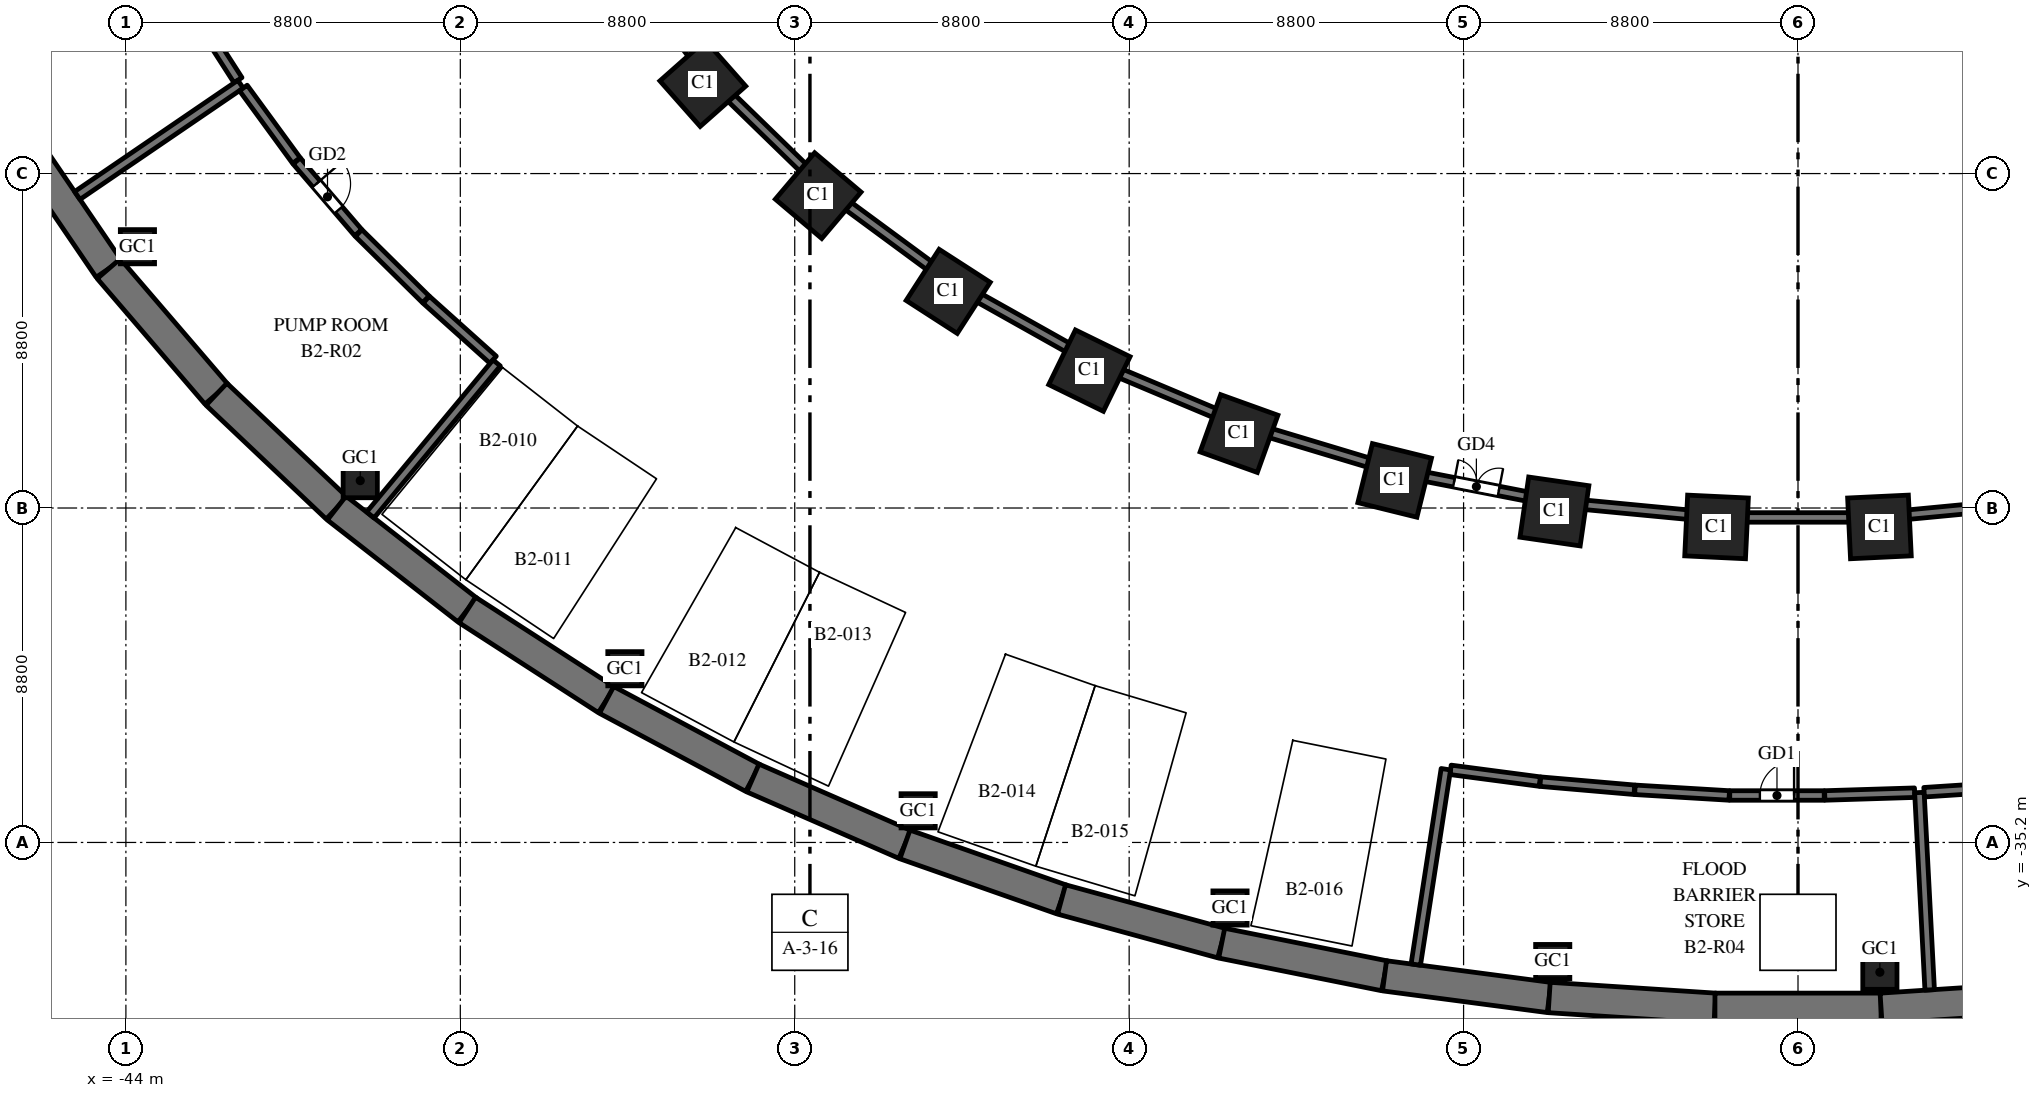
"""IFC4 building model, lengths in metres.
Left out: names, types, materials, properties, quantities, classifications, styles, units other than length and angle.
Written with IfcOpenShell. Run it as: python <this file> out.ifc"""

import sys

from ifc_helpers import new_model, si_unit, direction, frame, frame_2d, origin, origin_2d, place, context, subcontext, project, spatial, rectangle, hollow_rectangle, extrude, element, fill, save


model = new_model("IFC4")
c1 = context("Model", 3, precision=1e-05, world=origin(), true_north=direction((0.0, 1.0)))
c2 = subcontext(c1, "Body", "Model", "MODEL_VIEW")
j1 = project(units=[si_unit("LENGTHUNIT", "METRE"), si_unit("PLANEANGLEUNIT", "RADIAN")], contexts=[c1])
p1 = place(None, origin())
s1 = spatial("IfcSite", under=j1, at=p1, CompositionType="ELEMENT")
p2 = place(p1, origin())
s2 = spatial("IfcBuilding", under=s1, at=p2, CompositionType="ELEMENT")
p3 = place(p2, frame((0.0, 0.0, -8.4)))
s3 = spatial("IfcBuildingStorey", under=s2, at=p3, CompositionType="ELEMENT", Elevation=-8.4)
p4 = place(p3, frame((-46.899, -16.508, -0.3), z_axis=(0.0, 0.0, 1.0), x_axis=(0.562667738859, -0.82668314102, 0.0)))
e1 = element("IfcWall", 1, at=p4, inside=s3, PredefinedType="SOLIDWALL", context=c2, shape_type="SweptSolid", body=[
    extrude(rectangle(XDim=4.349, YDim=0.8, at=frame_2d((2.174, 0.0))), origin(), (0.0, 0.0, 1.0), 4.5),
])
p5 = place(p3, frame((-44.452, -20.104, -0.3), z_axis=(0.0, 0.0, 1.0), x_axis=(0.651387059497, -0.758745608699, 0.0)))
e2 = element("IfcWall", 2, at=p5, inside=s3, PredefinedType="SOLIDWALL", context=c2, shape_type="SweptSolid", body=[
    extrude(rectangle(XDim=4.353, YDim=0.8, at=frame_2d((2.176, 0.0))), origin(), (0.0, 0.0, 1.0), 4.5),
])
p6 = place(p3, frame((-41.617, -23.406, -0.3), z_axis=(0.0, 0.0, 1.0), x_axis=(0.72620446032, -0.687478786444, 0.0)))
e3 = element("IfcWall", 3, at=p6, inside=s3, PredefinedType="SOLIDWALL", context=c2, shape_type="SweptSolid", body=[
    extrude(rectangle(XDim=4.356, YDim=0.8, at=frame_2d((2.178, 0.0))), origin(), (0.0, 0.0, 1.0), 4.5),
])
p7 = place(p3, frame((-38.453, -26.401, -0.3), z_axis=(0.0, 0.0, 1.0), x_axis=(0.788491985196, -0.615045030288, 0.0)))
e4 = element("IfcWall", 4, at=p7, inside=s3, PredefinedType="SOLIDWALL", context=c2, shape_type="SweptSolid", body=[
    extrude(rectangle(XDim=4.359, YDim=0.8, at=frame_2d((2.18, 0.0))), origin(), (0.0, 0.0, 1.0), 4.5),
])
p8 = place(p3, frame((-35.016, -29.082, -0.3), z_axis=(0.0, 0.0, 1.0), x_axis=(0.840047348843, -0.542513088969, 0.0)))
e5 = element("IfcWall", 5, at=p8, inside=s3, PredefinedType="SOLIDWALL", context=c2, shape_type="SweptSolid", body=[
    extrude(rectangle(XDim=4.362, YDim=0.8, at=frame_2d((2.181, 0.0))), origin(), (0.0, 0.0, 1.0), 4.5),
])
p9 = place(p3, frame((-31.352, -31.448, -0.3), z_axis=(0.0, 0.0, 1.0), x_axis=(0.882159305704, -0.47095112205, 0.0)))
e6 = element("IfcWall", 6, at=p9, inside=s3, PredefinedType="SOLIDWALL", context=c2, shape_type="SweptSolid", body=[
    extrude(rectangle(XDim=4.365, YDim=0.8, at=frame_2d((2.182, 0.0))), origin(), (0.0, 0.0, 1.0), 4.5),
])
p10 = place(p3, frame((-27.501, -33.504, -0.3), z_axis=(0.0, 0.0, 1.0), x_axis=(0.916336904548, -0.400408138483, 0.0)))
e7 = element("IfcWall", 7, at=p10, inside=s3, PredefinedType="SOLIDWALL", context=c2, shape_type="SweptSolid", body=[
    extrude(rectangle(XDim=4.366, YDim=0.8, at=frame_2d((2.183, 0.0))), origin(), (0.0, 0.0, 1.0), 4.5),
])
p11 = place(p3, frame((-23.5, -35.252, -0.3), z_axis=(0.0, 0.0, 1.0), x_axis=(0.943526738033, -0.331296384853, 0.0)))
e8 = element("IfcWall", 8, at=p11, inside=s3, PredefinedType="SOLIDWALL", context=c2, shape_type="SweptSolid", body=[
    extrude(rectangle(XDim=4.368, YDim=0.8, at=frame_2d((2.184, 0.0))), origin(), (0.0, 0.0, 1.0), 4.5),
])
p12 = place(p3, frame((-19.379, -36.699, -0.3), z_axis=(0.0, 0.0, 1.0), x_axis=(0.964679950239, -0.263424739931, 0.0)))
e9 = element("IfcWall", 9, at=p12, inside=s3, PredefinedType="SOLIDWALL", context=c2, shape_type="SweptSolid", body=[
    extrude(rectangle(XDim=4.369, YDim=0.8, at=frame_2d((2.185, 0.0))), origin(), (0.0, 0.0, 1.0), 4.5),
])
p13 = place(p3, frame((-15.165, -37.85, -0.3), z_axis=(0.0, 0.0, 1.0), x_axis=(0.980494629762, -0.196545875071, 0.0)))
e10 = element("IfcWall", 10, at=p13, inside=s3, PredefinedType="SOLIDWALL", context=c2, shape_type="SweptSolid", body=[
    extrude(rectangle(XDim=4.37, YDim=0.8, at=frame_2d((2.185, 0.0))), origin(), (0.0, 0.0, 1.0), 4.5),
])
p14 = place(p3, frame((-10.88, -38.709, -0.3), z_axis=(0.0, 0.0, 1.0), x_axis=(0.991441741932, -0.130549884544, 0.0)))
e11 = element("IfcWall", 11, at=p14, inside=s3, PredefinedType="SOLIDWALL", context=c2, shape_type="SweptSolid", body=[
    extrude(rectangle(XDim=4.37, YDim=0.8, at=frame_2d((2.185, 0.0))), origin(), (0.0, 0.0, 1.0), 4.5),
])
p15 = place(p3, frame((-6.547, -39.28, -0.3), z_axis=(0.0, 0.0, 1.0), x_axis=(0.997876871627, -0.065128711577, 0.0)))
e12 = element("IfcWall", 12, at=p15, inside=s3, PredefinedType="SOLIDWALL", context=c2, shape_type="SweptSolid", body=[
    extrude(rectangle(XDim=4.371, YDim=0.8, at=frame_2d((2.186, 0.0))), origin(), (0.0, 0.0, 1.0), 4.5),
])
p16 = place(p3, frame((-2.186, -39.564, -0.3), z_axis=(0.0, 0.0, 1.0), x_axis=(1.0, 0.0, 0.0)))
e13 = element("IfcWall", 13, at=p16, inside=s3, PredefinedType="SOLIDWALL", context=c2, shape_type="SweptSolid", body=[
    extrude(rectangle(XDim=4.371, YDim=0.8, at=frame_2d((2.186, 0.0))), origin(), (0.0, 0.0, 1.0), 4.5),
])
p17 = place(p3, frame((2.186, -39.564, -0.3), z_axis=(0.0, 0.0, 1.0), x_axis=(0.997876871627, 0.065128711577, 0.0)))
e14 = element("IfcWall", 14, at=p17, inside=s3, PredefinedType="SOLIDWALL", context=c2, shape_type="SweptSolid", body=[
    extrude(rectangle(XDim=4.371, YDim=0.8, at=frame_2d((2.186, 0.0))), origin(), (0.0, 0.0, 1.0), 4.5),
])
for number, where, z_axis, x_axis in (
    (15, (-28.819, -15.23, -0.3), (0.0, 0.0, 1.0), (0.663, -0.749, 0.0)),
    (16, (-25.783, -18.18, -0.3), (0.0, 0.0, 1.0), (0.763, -0.646, 0.0)),
    (17, (-22.362, -20.7, -0.3), (0.0, 0.0, 1.0), (0.84, -0.542, 0.0)),
    (18, (-18.646, -22.785, -0.3), (0.0, 0.0, 1.0), (0.898, -0.439, 0.0)),
    (19, (-14.709, -24.441, -0.3), (0.0, 0.0, 1.0), (0.941, -0.338, 0.0)),
    (20, (-10.613, -25.674, -0.3), (0.0, 0.0, 1.0), (0.971, -0.24, 0.0)),
    (21, (-6.409, -26.491, -0.3), (0.0, 0.0, 1.0), (0.99, -0.143, 0.0)),
    (22, (-2.143, -26.898, -0.3), (0.0, 0.0, 1.0), (0.999, -0.048, 0.0)),
    (23, (2.143, -26.898, -0.3), (0.0, 0.0, 1.0), (0.999, 0.048, 0.0)),
):
    element("IfcColumn", number, at=place(p3, frame(where, z_axis=z_axis, x_axis=x_axis)), inside=s3, PredefinedType="COLUMN", context=c2, shape_type="SweptSolid", body=[
        extrude(rectangle(XDim=1.6, YDim=1.6, at=origin_2d()), origin(), (0.0, 0.0, 1.0), 4.5),
    ])
for number, where, z_axis, x_axis in (
    (24, (-43.696, -19.525, -0.3), (0.0, 0.0, 1.0), (1.0, 0.0, 0.0)),
    (25, (-37.833, -25.68, -0.3), (0.0, 0.0, 1.0), (1.0, 0.0, 0.0)),
    (26, (-30.869, -30.629, -0.3), (0.0, 0.0, 1.0), (1.0, 0.0, 0.0)),
    (27, (-23.153, -34.368, -0.3), (0.0, 0.0, 1.0), (1.0, 0.0, 0.0)),
    (28, (-14.946, -36.925, -0.3), (0.0, 0.0, 1.0), (1.0, 0.0, 0.0)),
    (29, (-6.454, -38.333, -0.3), (0.0, 0.0, 1.0), (1.0, 0.0, 0.0)),
    (30, (2.155, -38.614, -0.3), (0.0, 0.0, 1.0), (1.0, 0.0, 0.0)),
):
    element("IfcColumn", number, at=place(p3, frame(where, z_axis=z_axis, x_axis=x_axis)), inside=s3, PredefinedType="COLUMN", context=c2, shape_type="SweptSolid", body=[
        extrude(hollow_rectangle(XDim=0.9, YDim=0.9, WallThickness=0.045, at=origin_2d()), origin(), (0.0, 0.0, 1.0), 4.5),
    ])
p18 = place(p3, frame((-42.329, -13.153, 0.0), z_axis=(0.0, 0.0, 1.0), x_axis=(0.540564514589, -0.841302564817, 0.0)))
e31 = element("IfcWall", 31, at=p18, inside=s3, PredefinedType="SOLIDWALL", context=c2, shape_type="SweptSolid", body=[
    extrude(rectangle(XDim=2.365, YDim=0.25, at=frame_2d((1.182, 0.0))), origin(), (0.0, 0.0, 1.0), 3.9),
])
p19 = place(p3, frame((-40.983, -15.248, 0.0), z_axis=(0.0, 0.0, 1.0), x_axis=(-0.826124026694, -0.563488325096, 0.0)))
e32 = element("IfcWall", 32, at=p19, inside=s3, PredefinedType="SOLIDWALL", context=c2, shape_type="SweptSolid", body=[
    extrude(rectangle(XDim=5.2, YDim=0.25, at=frame_2d((2.6, 0.0))), origin(), (0.0, 0.0, 1.0), 3.3),
])
p20 = place(p3, frame((-40.909, -15.349, 0.0), z_axis=(0.0, 0.0, 1.0), x_axis=(0.590109768625, -0.807323021457, 0.0)))
e33 = element("IfcWall", 33, at=p20, inside=s3, PredefinedType="SOLIDWALL", context=c2, shape_type="SweptSolid", body=[
    extrude(rectangle(XDim=2.365, YDim=0.25, at=frame_2d((1.182, 0.0))), origin(), (0.0, 0.0, 1.0), 3.9),
])
p21 = place(p3, frame((-39.505, -17.269, 0.0), z_axis=(0.0, 0.0, 1.0), x_axis=(0.651397729765, -0.758736448088, 0.0)))
e34 = element("IfcWall", 34, at=p21, inside=s3, PredefinedType="SOLIDWALL", context=c2, shape_type="SweptSolid", body=[
    extrude(rectangle(XDim=2.486, YDim=0.25, at=frame_2d((1.243, 0.0))), origin(), (0.0, 0.0, 1.0), 2.9),
])
p22 = place(p21, frame((0.793, 0.0, 0.0)))
e35 = element("IfcOpeningElement", 35, at=p22, cuts=e34, PredefinedType="OPENING", context=c2, shape_type="SweptSolid", body=[
    extrude(rectangle(XDim=0.9, YDim=2.1, at=frame_2d((0.45, 1.05))), frame((0.0, 0.135, 0.0), z_axis=(0.0, -1.0, 0.0), x_axis=(1.0, 0.0, 0.0)), (0.0, 0.0, 1.0), 0.27),
])
p23 = place(p3, frame((-37.876, -19.165, 0.0), z_axis=(0.0, 0.0, 1.0), x_axis=(0.711906535722, -0.702274223075, 0.0)))
e36 = element("IfcWall", 36, at=p23, inside=s3, PredefinedType="SOLIDWALL", context=c2, shape_type="SweptSolid", body=[
    extrude(rectangle(XDim=2.484, YDim=0.25, at=frame_2d((1.242, 0.0))), origin(), (0.0, 0.0, 1.0), 3.9),
])
p24 = place(p3, frame((-36.098, -20.919, 0.0), z_axis=(0.0, 0.0, 1.0), x_axis=(0.744401404245, -0.667732393522, 0.0)))
e37 = element("IfcWall", 37, at=p24, inside=s3, PredefinedType="SOLIDWALL", context=c2, shape_type="SweptSolid", body=[
    extrude(rectangle(XDim=2.366, YDim=0.25, at=frame_2d((1.183, 0.0))), origin(), (0.0, 0.0, 1.0), 3.9),
])
p25 = place(p3, frame((-34.243, -22.583, 0.0), z_axis=(0.0, 0.0, 1.0), x_axis=(-0.639135501732, -0.76909414926, 0.0)))
e38 = element("IfcWall", 38, at=p25, inside=s3, PredefinedType="SOLIDWALL", context=c2, shape_type="SweptSolid", body=[
    extrude(rectangle(XDim=5.2, YDim=0.25, at=frame_2d((2.6, 0.0))), origin(), (0.0, 0.0, 1.0), 2.9),
])
p26 = place(p3, frame((-9.143, -33.289, 0.0), z_axis=(0.0, 0.0, 1.0), x_axis=(0.99143111876, -0.130630535303, 0.0)))
e39 = element("IfcWall", 39, at=p26, inside=s3, PredefinedType="SOLIDWALL", context=c2, shape_type="SweptSolid", body=[
    extrude(rectangle(XDim=2.368, YDim=0.25, at=frame_2d((1.184, 0.0))), origin(), (0.0, 0.0, 1.0), 3.9),
])
p27 = place(p3, frame((-6.781, -33.6, 0.0), z_axis=(0.0, 0.0, 1.0), x_axis=(0.996297517405, -0.085972418908, 0.0)))
e40 = element("IfcWall", 40, at=p27, inside=s3, PredefinedType="SOLIDWALL", context=c2, shape_type="SweptSolid", body=[
    extrude(rectangle(XDim=2.485, YDim=0.25, at=frame_2d((1.242, 0.0))), origin(), (0.0, 0.0, 1.0), 2.9),
])
p28 = place(p3, frame((-4.291, -33.815, 0.0), z_axis=(0.0, 0.0, 1.0), x_axis=(0.998197320721, -0.060017571636, 0.0)))
e41 = element("IfcWall", 41, at=p28, inside=s3, PredefinedType="SOLIDWALL", context=c2, shape_type="SweptSolid", body=[
    extrude(rectangle(XDim=2.485, YDim=0.25, at=frame_2d((1.243, 0.0))), origin(), (0.0, 0.0, 1.0), 3.9),
])
p29 = place(p3, frame((-1.796, -33.964, 0.0), z_axis=(0.0, 0.0, 1.0), x_axis=(1.0, 0.0, 0.0)))
e42 = element("IfcWall", 42, at=p29, inside=s3, PredefinedType="SOLIDWALL", context=c2, shape_type="SweptSolid", body=[
    extrude(rectangle(XDim=2.486, YDim=0.25, at=frame_2d((1.243, 0.0))), origin(), (0.0, 0.0, 1.0), 3.9),
])
p30 = place(p29, frame((0.793, 0.0, 0.0)))
e43 = element("IfcOpeningElement", 43, at=p30, cuts=e42, PredefinedType="OPENING", context=c2, shape_type="SweptSolid", body=[
    extrude(rectangle(XDim=0.9, YDim=2.1, at=frame_2d((0.45, 1.05))), frame((0.0, 0.135, 0.0), z_axis=(0.0, -1.0, 0.0), x_axis=(1.0, 0.0, 0.0)), (0.0, 0.0, 1.0), 0.27),
])
p31 = place(p3, frame((0.704, -33.964, 0.0), z_axis=(0.0, 0.0, 1.0), x_axis=(0.999514588935, 0.031154237368, 0.0)))
e44 = element("IfcWall", 44, at=p31, inside=s3, PredefinedType="SOLIDWALL", context=c2, shape_type="SweptSolid", body=[
    extrude(rectangle(XDim=2.367, YDim=0.25, at=frame_2d((1.183, 0.0))), origin(), (0.0, 0.0, 1.0), 2.9),
])
for number, where, z_axis, x_axis in (
    (45, (-9.267, -33.273, 0.0), (0.0, 0.0, 1.0), (-0.152, -0.988, 0.0)),
    (46, (3.194, -33.886, 0.0), (0.0, 0.0, 1.0), (0.052, -0.999, 0.0)),
):
    element("IfcWall", number, at=place(p3, frame(where, z_axis=z_axis, x_axis=x_axis)), inside=s3, PredefinedType="SOLIDWALL", context=c2, shape_type="SweptSolid", body=[
        extrude(rectangle(XDim=5.2, YDim=0.25, at=frame_2d((2.6, 0.0))), origin(), (0.0, 0.0, 1.0), 3.3),
    ])
p32 = place(p3, frame((3.319, -33.878, 0.0), z_axis=(0.0, 0.0, 1.0), x_axis=(0.997874570946, 0.065163952143, 0.0)))
e47 = element("IfcWall", 47, at=p32, inside=s3, PredefinedType="SOLIDWALL", context=c2, shape_type="SweptSolid", body=[
    extrude(rectangle(XDim=2.368, YDim=0.25, at=frame_2d((1.184, 0.0))), origin(), (0.0, 0.0, 1.0), 3.9),
])
p33 = place(p3, frame((-31.148, -11.744, 0.0), z_axis=(0.0, 0.0, 1.0), x_axis=(0.604041965907, -0.796952510143, 0.0)))
e48 = element("IfcWall", 48, at=p33, inside=s3, PredefinedType="SOLIDWALL", context=c2, shape_type="SweptSolid", body=[
    extrude(rectangle(XDim=4.157, YDim=0.25, at=frame_2d((2.079, 0.0))), origin(), (0.0, 0.0, 1.0), 3.0),
])
p34 = place(p33, frame((1.479, 0.0, 0.0)))
e49 = element("IfcOpeningElement", 49, at=p34, cuts=e48, PredefinedType="OPENING", context=c2, shape_type="SweptSolid", body=[
    extrude(rectangle(XDim=1.2, YDim=2.1, at=frame_2d((0.6, 1.05))), frame((0.0, 0.135, 0.0), z_axis=(0.0, -1.0, 0.0), x_axis=(1.0, 0.0, 0.0)), (0.0, 0.0, 1.0), 0.27),
])
p35 = place(p3, frame((-28.625, -15.071, 0.0), z_axis=(0.0, 0.0, 1.0), x_axis=(0.717227656803, -0.696838925661, 0.0)))
e50 = element("IfcWall", 50, at=p35, inside=s3, PredefinedType="SOLIDWALL", context=c2, shape_type="SweptSolid", body=[
    extrude(rectangle(XDim=4.179, YDim=0.25, at=frame_2d((2.089, 0.0))), origin(), (0.0, 0.0, 1.0), 3.0),
])
p36 = place(p3, frame((-25.614, -17.994, 0.0), z_axis=(0.0, 0.0, 1.0), x_axis=(0.805155221937, -0.593064135306, 0.0)))
e51 = element("IfcWall", 51, at=p36, inside=s3, PredefinedType="SOLIDWALL", context=c2, shape_type="SweptSolid", body=[
    extrude(rectangle(XDim=4.198, YDim=0.25, at=frame_2d((2.099, 0.0))), origin(), (0.0, 0.0, 1.0), 3.0),
])
p37 = place(p3, frame((-22.219, -20.494, 0.0), z_axis=(0.0, 0.0, 1.0), x_axis=(0.872061015455, -0.489397165218, 0.0)))
e52 = element("IfcWall", 52, at=p37, inside=s3, PredefinedType="SOLIDWALL", context=c2, shape_type="SweptSolid", body=[
    extrude(rectangle(XDim=4.213, YDim=0.25, at=frame_2d((2.107, 0.0))), origin(), (0.0, 0.0, 1.0), 3.0),
])
p38 = place(p3, frame((-18.528, -22.564, 0.0), z_axis=(0.0, 0.0, 1.0), x_axis=(0.921810386469, -0.387641085798, 0.0)))
e53 = element("IfcWall", 53, at=p38, inside=s3, PredefinedType="SOLIDWALL", context=c2, shape_type="SweptSolid", body=[
    extrude(rectangle(XDim=4.225, YDim=0.25, at=frame_2d((2.113, 0.0))), origin(), (0.0, 0.0, 1.0), 3.0),
])
p39 = place(p3, frame((-14.616, -24.208, 0.0), z_axis=(0.0, 0.0, 1.0), x_axis=(0.957589494621, -0.28813600919, 0.0)))
e54 = element("IfcWall", 54, at=p39, inside=s3, PredefinedType="SOLIDWALL", context=c2, shape_type="SweptSolid", body=[
    extrude(rectangle(XDim=4.234, YDim=0.25, at=frame_2d((2.117, 0.0))), origin(), (0.0, 0.0, 1.0), 3.0),
])
p40 = place(p3, frame((-10.544, -25.432, 0.0), z_axis=(0.0, 0.0, 1.0), x_axis=(0.981622881166, -0.190831127365, 0.0)))
e55 = element("IfcWall", 55, at=p40, inside=s3, PredefinedType="SOLIDWALL", context=c2, shape_type="SweptSolid", body=[
    extrude(rectangle(XDim=4.24, YDim=0.25, at=frame_2d((2.12, 0.0))), origin(), (0.0, 0.0, 1.0), 3.0),
])
p41 = place(p40, frame((1.52, 0.0, 0.0)))
e56 = element("IfcOpeningElement", 56, at=p41, cuts=e55, PredefinedType="OPENING", context=c2, shape_type="SweptSolid", body=[
    extrude(rectangle(XDim=1.2, YDim=2.1, at=frame_2d((0.6, 1.05))), frame((0.0, 0.135, 0.0), z_axis=(0.0, -1.0, 0.0), x_axis=(1.0, 0.0, 0.0)), (0.0, 0.0, 1.0), 0.27),
])
p42 = place(p3, frame((-6.365, -26.244, 0.0), z_axis=(0.0, 0.0, 1.0), x_axis=(0.995473208191, -0.09504257874, 0.0)))
e57 = element("IfcWall", 57, at=p42, inside=s3, PredefinedType="SOLIDWALL", context=c2, shape_type="SweptSolid", body=[
    extrude(rectangle(XDim=4.244, YDim=0.25, at=frame_2d((2.122, 0.0))), origin(), (0.0, 0.0, 1.0), 3.0),
])
p43 = place(p3, frame((-2.122, -26.648, 0.0), z_axis=(0.0, 0.0, 1.0), x_axis=(1.0, 0.0, 0.0)))
e58 = element("IfcWall", 58, at=p43, inside=s3, PredefinedType="SOLIDWALL", context=c2, shape_type="SweptSolid", body=[
    extrude(rectangle(XDim=4.245, YDim=0.25, at=frame_2d((2.122, 0.0))), origin(), (0.0, 0.0, 1.0), 3.0),
])
p44 = place(p3, frame((2.14, -26.647, 0.0), z_axis=(0.0, 0.0, 1.0), x_axis=(0.995473208191, 0.09504257874, 0.0)))
e59 = element("IfcWall", 59, at=p44, inside=s3, PredefinedType="SOLIDWALL", context=c2, shape_type="SweptSolid", body=[
    extrude(rectangle(XDim=4.244, YDim=0.25, at=frame_2d((2.122, 0.0))), origin(), (0.0, 0.0, 1.0), 3.0),
])
p45 = place(p22, origin())
e60 = element("IfcDoor", 60, at=p45, inside=s3, OperationType="SINGLE_SWING_LEFT", PredefinedType="DOOR", context=c2, shape_type="SweptSolid", body=[
    extrude(rectangle(XDim=0.9, YDim=2.1, at=frame_2d((0.45, 1.05))), frame((0.0, 0.025, 0.0), z_axis=(0.0, -1.0, 0.0), x_axis=(1.0, 0.0, 0.0)), (0.0, 0.0, 1.0), 0.05),
])
fill(e35, e60)
p46 = place(p30, origin())
e61 = element("IfcDoor", 61, at=p46, inside=s3, OperationType="SINGLE_SWING_RIGHT", PredefinedType="DOOR", context=c2, shape_type="SweptSolid", body=[
    extrude(rectangle(XDim=0.9, YDim=2.1, at=frame_2d((0.45, 1.05))), frame((0.0, 0.025, 0.0), z_axis=(0.0, -1.0, 0.0), x_axis=(1.0, 0.0, 0.0)), (0.0, 0.0, 1.0), 0.05),
])
fill(e43, e61)
p47 = place(p41, origin())
e62 = element("IfcDoor", 62, at=p47, inside=s3, OperationType="DOUBLE_DOOR_SINGLE_SWING", PredefinedType="DOOR", context=c2, shape_type="SweptSolid", body=[
    extrude(rectangle(XDim=1.2, YDim=2.1, at=frame_2d((0.6, 1.05))), frame((0.0, 0.025, 0.0), z_axis=(0.0, -1.0, 0.0), x_axis=(1.0, 0.0, 0.0)), (0.0, 0.0, 1.0), 0.05),
])
fill(e56, e62)
save(model, sys.argv[1])
